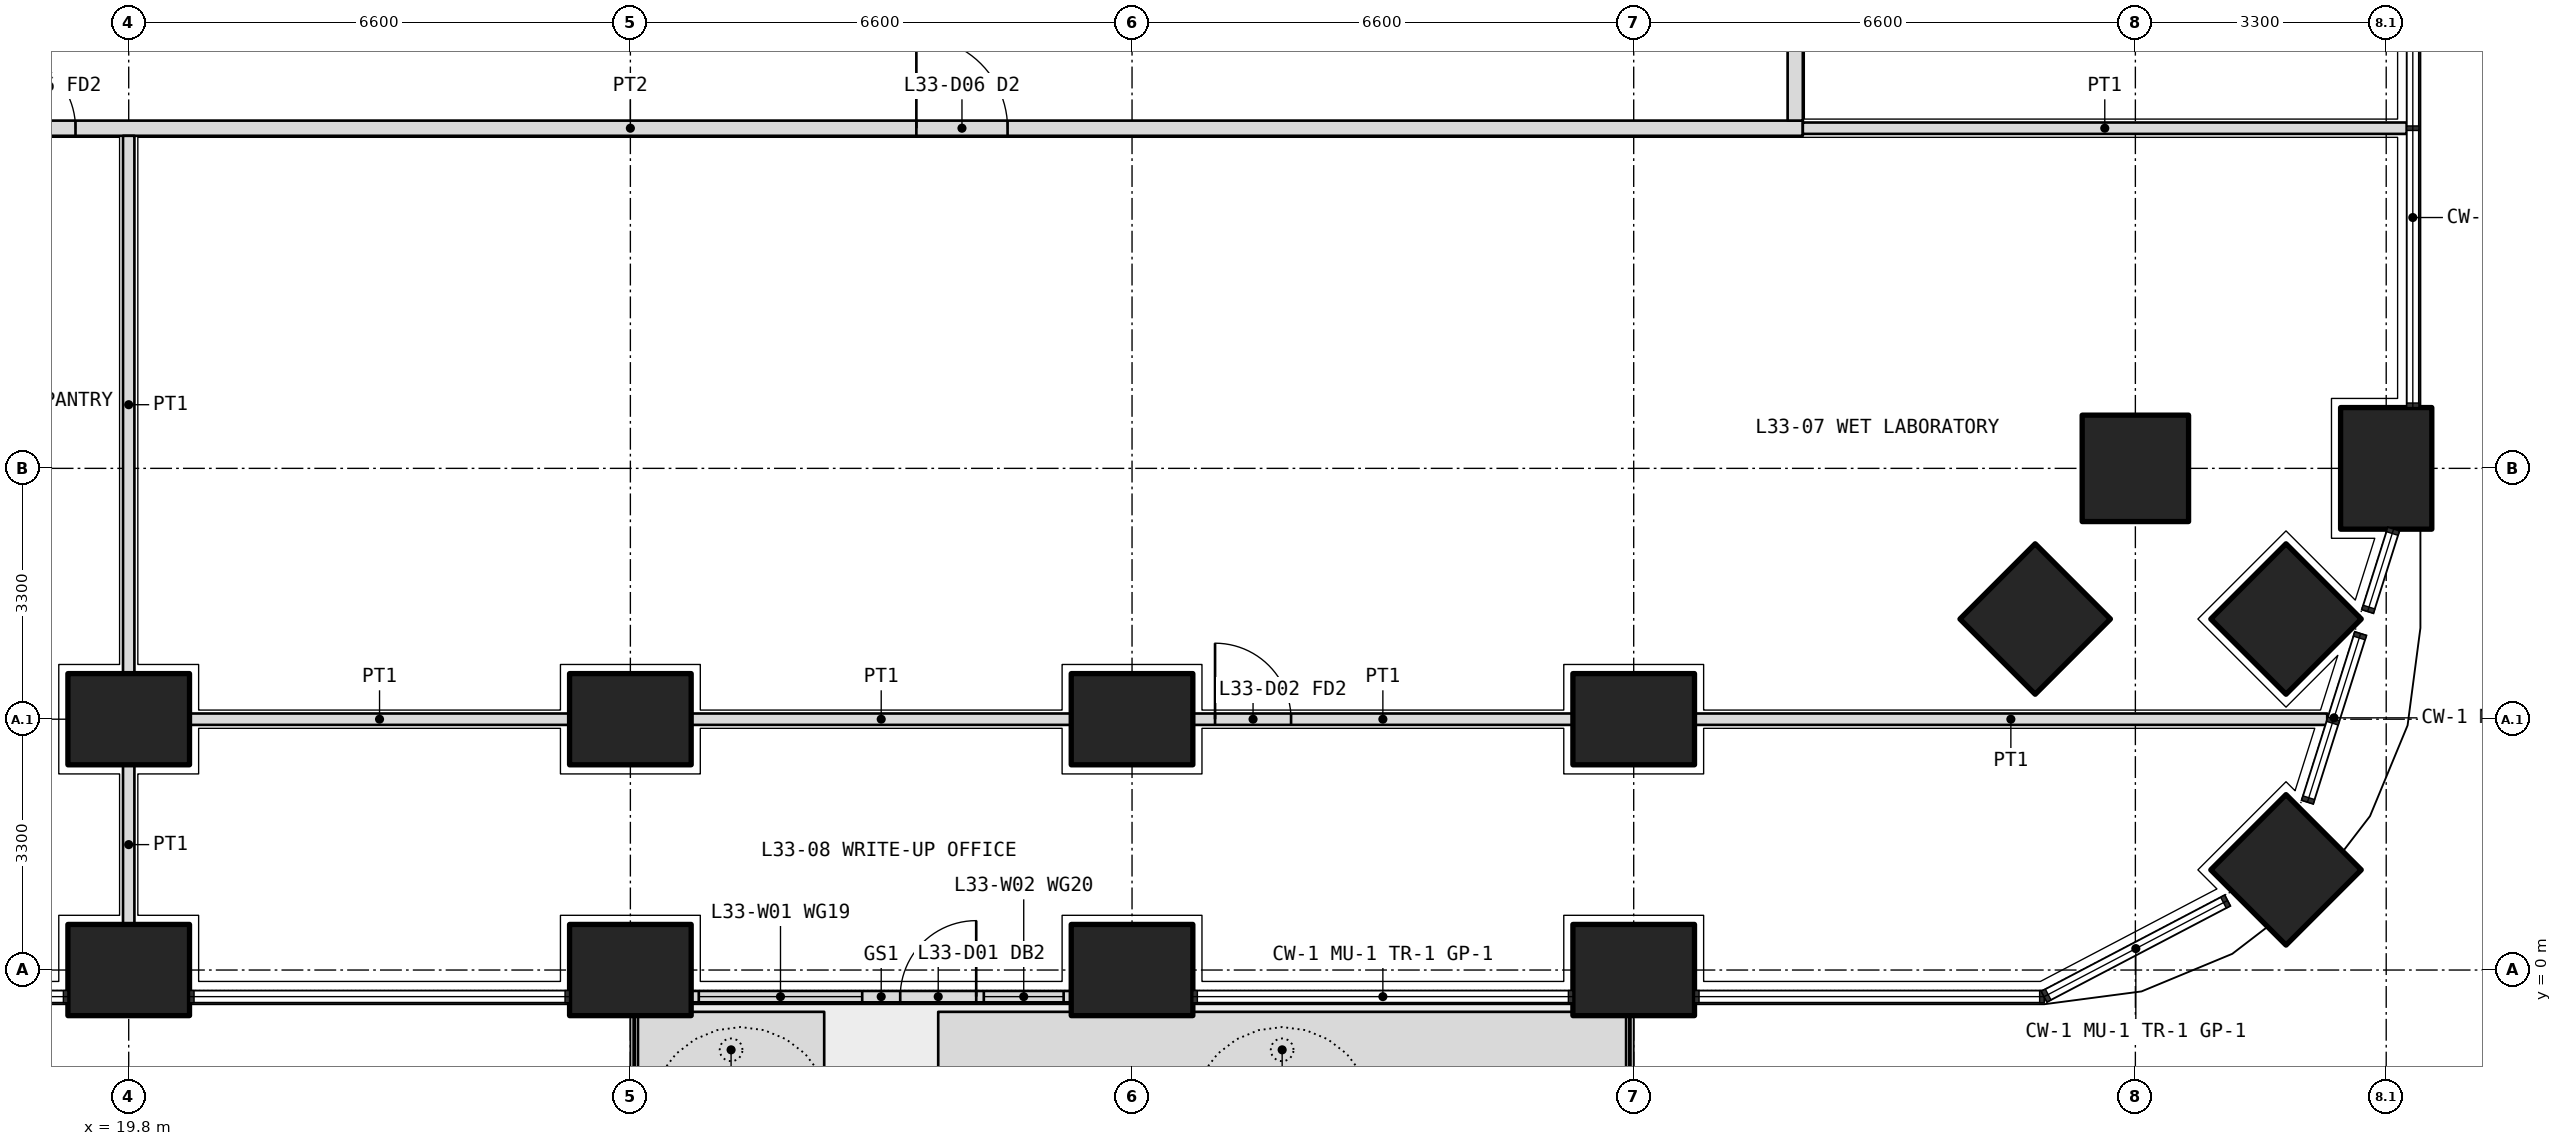
"""IFC4 building model, lengths in metres.
Left out: names, types, materials, properties, quantities, classifications, styles, units other than length and angle.
Written with IfcOpenShell. Run it as: python <this file> out.ifc"""

import sys

from ifc_helpers import new_model, si_unit, direction, frame, frame_2d, origin, origin_2d, place, context, subcontext, project, spatial, polyline, rectangle, outline, extrude, element, fill, save


model = new_model("IFC4")
c1 = context("Model", 3, precision=1e-05, world=origin(), true_north=direction((0.0, 1.0)))
c2 = subcontext(c1, "Body", "Model", "MODEL_VIEW")
j1 = project(units=[si_unit("LENGTHUNIT", "METRE"), si_unit("PLANEANGLEUNIT", "RADIAN")], contexts=[c1])
p1 = place(None, origin())
s1 = spatial("IfcSite", under=j1, at=p1, CompositionType="ELEMENT")
p2 = place(p1, origin())
s2 = spatial("IfcBuilding", under=s1, at=p2, CompositionType="ELEMENT")
p3 = place(p2, frame((0.0, 0.0, 145.2)))
s3 = spatial("IfcBuildingStorey", under=s2, at=p3, CompositionType="ELEMENT", Elevation=145.2)
p4 = place(p3, frame((48.182, 1.318, 0.0), z_axis=(0.0, 0.0, 1.0), x_axis=(0.707106781187, 0.707106781187, 0.0)))
e1 = element("IfcColumn", 1, at=p4, inside=s3, PredefinedType="COLUMN", context=c2, shape_type="SweptSolid", body=[
    extrude(rectangle(XDim=1.4, YDim=1.4, at=origin_2d()), origin(), (0.0, 0.0, 1.0), 4.2),
])
for number, where, z_axis, x_axis in (
    (2, (19.8, 0.0, 0.0), (0.0, 0.0, 1.0), (1.0, 0.0, 0.0)),
    (3, (26.4, 0.0, 0.0), (0.0, 0.0, 1.0), (1.0, 0.0, 0.0)),
    (4, (33.0, 0.0, 0.0), (0.0, 0.0, 1.0), (1.0, 0.0, 0.0)),
    (5, (39.6, 0.0, 0.0), (0.0, 0.0, 1.0), (1.0, 0.0, 0.0)),
    (6, (49.5, 6.6, 0.0), (0.0, 0.0, 1.0), (0.0, 1.0, 0.0)),
):
    element("IfcColumn", number, at=place(p3, frame(where, z_axis=z_axis, x_axis=x_axis)), inside=s3, PredefinedType="COLUMN", context=c2, shape_type="SweptSolid", body=[
        extrude(rectangle(XDim=1.6, YDim=1.2, at=origin_2d()), origin(), (0.0, 0.0, 1.0), 4.2),
    ])
for number, where, z_axis, x_axis in (
    (7, (46.2, 6.6, 0.0), (0.0, 0.0, 1.0), (1.0, 0.0, 0.0)),
    (8, (48.182, 4.618, 0.0), (0.0, 0.0, 1.0), (0.707, 0.707, 0.0)),
):
    element("IfcColumn", number, at=place(p3, frame(where, z_axis=z_axis, x_axis=x_axis)), inside=s3, PredefinedType="COLUMN", context=c2, shape_type="SweptSolid", body=[
        extrude(rectangle(XDim=1.4, YDim=1.4, at=origin_2d()), origin(), (0.0, 0.0, 1.0), 4.2),
    ])
for number, where, z_axis, x_axis in (
    (9, (19.8, 3.3, 0.0), (0.0, 0.0, 1.0), (1.0, 0.0, 0.0)),
    (10, (26.4, 3.3, 0.0), (0.0, 0.0, 1.0), (1.0, 0.0, 0.0)),
    (11, (33.0, 3.3, 0.0), (0.0, 0.0, 1.0), (1.0, 0.0, 0.0)),
    (12, (39.6, 3.3, 0.0), (0.0, 0.0, 1.0), (1.0, 0.0, 0.0)),
):
    element("IfcColumn", number, at=place(p3, frame(where, z_axis=z_axis, x_axis=x_axis)), inside=s3, PredefinedType="COLUMN", context=c2, shape_type="SweptSolid", body=[
        extrude(rectangle(XDim=1.6, YDim=1.2, at=origin_2d()), origin(), (0.0, 0.0, 1.0), 4.2),
    ])
p5 = place(p3, frame((44.882, 4.618, 0.0), z_axis=(0.0, 0.0, 1.0), x_axis=(0.707106781187, 0.707106781187, 0.0)))
e13 = element("IfcColumn", 13, at=p5, inside=s3, PredefinedType="COLUMN", context=c2, shape_type="SweptSolid", body=[
    extrude(rectangle(XDim=1.4, YDim=1.4, at=origin_2d()), origin(), (0.0, 0.0, 1.0), 4.2),
])
p6 = place(p3, origin())
e14 = element("IfcWall", 14, at=p6, inside=s3, PredefinedType="USERDEFINED", context=c2, shape_type="SweptSolid", body=[
    extrude(outline(polyline([(26.5, -1.55), (28.95, -1.55), (28.95, -0.55), (26.5, -0.55), (26.5, -1.55)]), holes=[polyline([(26.65, -1.4), (28.8, -1.4), (28.8, -0.7), (26.65, -0.7), (26.65, -1.4)])]), origin(), (0.0, 0.0, 1.0), 1.05),
])
p7 = place(p3, origin())
e15 = element("IfcWall", 15, at=p7, inside=s3, PredefinedType="USERDEFINED", context=c2, shape_type="SweptSolid", body=[
    extrude(outline(polyline([(30.45, -1.55), (39.5, -1.55), (39.5, -0.55), (30.45, -0.55), (30.45, -1.55)]), holes=[polyline([(30.6, -1.4), (39.35, -1.4), (39.35, -0.7), (30.6, -0.7), (30.6, -1.4)])]), origin(), (0.0, 0.0, 1.0), 1.05),
])
p8 = place(p3, frame((27.2, -0.35, 0.0), z_axis=(0.0, 0.0, 1.0), x_axis=(1.0, 0.0, 0.0)))
e16 = element("IfcWall", 16, at=p8, inside=s3, PredefinedType="SOLIDWALL", context=c2, shape_type="SweptSolid", body=[
    extrude(rectangle(XDim=5.0, YDim=0.15, at=frame_2d((2.5, 0.0))), origin(), (0.0, 0.0, 1.0), 2.05),
])
p9 = place(p8, frame((2.75, 0.0, 0.0)))
e17 = element("IfcOpeningElement", 17, at=p9, cuts=e16, PredefinedType="OPENING", context=c2, shape_type="SweptSolid", body=[
    extrude(rectangle(XDim=1.0, YDim=2.0, at=frame_2d((0.5, 1.0))), frame((0.0, 0.085, 0.0), z_axis=(0.0, -1.0, 0.0), x_axis=(1.0, 0.0, 0.0)), (0.0, 0.0, 1.0), 0.17),
])
p10 = place(p8, frame((0.1, 0.0, 0.1)))
e18 = element("IfcOpeningElement", 18, at=p10, cuts=e16, PredefinedType="OPENING", context=c2, shape_type="SweptSolid", body=[
    extrude(rectangle(XDim=2.15, YDim=1.65, at=frame_2d((1.075, 0.825))), frame((0.0, 0.085, 0.0), z_axis=(0.0, -1.0, 0.0), x_axis=(1.0, 0.0, 0.0)), (0.0, 0.0, 1.0), 0.17),
])
p11 = place(p8, frame((3.85, 0.0, 0.1)))
e19 = element("IfcOpeningElement", 19, at=p11, cuts=e16, PredefinedType="OPENING", context=c2, shape_type="SweptSolid", body=[
    extrude(rectangle(XDim=1.05, YDim=1.65, at=frame_2d((0.525, 0.825))), frame((0.0, 0.085, 0.0), z_axis=(0.0, -1.0, 0.0), x_axis=(1.0, 0.0, 0.0)), (0.0, 0.0, 1.0), 0.17),
])
p12 = place(p3, frame((10.975, 11.075, 0.0), z_axis=(0.0, 0.0, 1.0), x_axis=(1.0, 0.0, 0.0)))
e20 = element("IfcWall", 20, at=p12, inside=s3, PredefinedType="PARTITIONING", context=c2, shape_type="SweptSolid", body=[
    extrude(rectangle(XDim=30.85, YDim=0.2, at=frame_2d((15.425, 0.0))), origin(), (0.0, 0.0, 1.0), 2.55),
])
p13 = place(p12, frame((0.663, 0.0, 0.0)))
e21 = element("IfcOpeningElement", 21, at=p13, cuts=e20, PredefinedType="OPENING", context=c2, shape_type="SweptSolid", body=[
    extrude(rectangle(XDim=1.0, YDim=2.1, at=frame_2d((0.5, 1.05))), frame((0.0, 0.11, 0.0), z_axis=(0.0, -1.0, 0.0), x_axis=(1.0, 0.0, 0.0)), (0.0, 0.0, 1.0), 0.22),
])
p14 = place(p12, frame((3.825, 0.0, 0.0)))
e22 = element("IfcOpeningElement", 22, at=p14, cuts=e20, PredefinedType="OPENING", context=c2, shape_type="SweptSolid", body=[
    extrude(rectangle(XDim=1.0, YDim=2.1, at=frame_2d((0.5, 1.05))), frame((0.0, 0.11, 0.0), z_axis=(0.0, -1.0, 0.0), x_axis=(1.0, 0.0, 0.0)), (0.0, 0.0, 1.0), 0.22),
])
p15 = place(p12, frame((7.125, 0.0, 0.0)))
e23 = element("IfcOpeningElement", 23, at=p15, cuts=e20, PredefinedType="OPENING", context=c2, shape_type="SweptSolid", body=[
    extrude(rectangle(XDim=1.0, YDim=2.1, at=frame_2d((0.5, 1.05))), frame((0.0, 0.11, 0.0), z_axis=(0.0, -1.0, 0.0), x_axis=(1.0, 0.0, 0.0)), (0.0, 0.0, 1.0), 0.22),
])
p16 = place(p12, frame((19.188, 0.0, 0.0)))
e24 = element("IfcOpeningElement", 24, at=p16, cuts=e20, PredefinedType="OPENING", context=c2, shape_type="SweptSolid", body=[
    extrude(rectangle(XDim=1.2, YDim=2.1, at=frame_2d((0.6, 1.05))), frame((0.0, 0.11, 0.0), z_axis=(0.0, -1.0, 0.0), x_axis=(1.0, 0.0, 0.0)), (0.0, 0.0, 1.0), 0.22),
])
p17 = place(p3, frame((41.725, 11.175, 0.0), z_axis=(0.0, 0.0, 1.0), x_axis=(0.0, 1.0, 0.0)))
e25 = element("IfcWall", 25, at=p17, inside=s3, PredefinedType="PARTITIONING", context=c2, shape_type="SweptSolid", body=[
    extrude(rectangle(XDim=27.625, YDim=0.2, at=frame_2d((13.812, 0.0))), origin(), (0.0, 0.0, 1.0), 2.55),
])
p18 = place(p17, frame((3.762, 0.0, 0.0)))
e26 = element("IfcOpeningElement", 26, at=p18, cuts=e25, PredefinedType="OPENING", context=c2, shape_type="SweptSolid", body=[
    extrude(rectangle(XDim=1.0, YDim=2.1, at=frame_2d((0.5, 1.05))), frame((0.0, 0.11, 0.0), z_axis=(0.0, -1.0, 0.0), x_axis=(1.0, 0.0, 0.0)), (0.0, 0.0, 1.0), 0.22),
])
p19 = place(p17, frame((9.725, 0.0, 0.0)))
e27 = element("IfcOpeningElement", 27, at=p19, cuts=e25, PredefinedType="OPENING", context=c2, shape_type="SweptSolid", body=[
    extrude(rectangle(XDim=1.0, YDim=2.1, at=frame_2d((0.5, 1.05))), frame((0.0, 0.11, 0.0), z_axis=(0.0, -1.0, 0.0), x_axis=(1.0, 0.0, 0.0)), (0.0, 0.0, 1.0), 0.22),
])
p20 = place(p17, frame((13.075, 0.0, 0.0)))
e28 = element("IfcOpeningElement", 28, at=p20, cuts=e25, PredefinedType="OPENING", context=c2, shape_type="SweptSolid", body=[
    extrude(rectangle(XDim=0.9, YDim=2.1, at=frame_2d((0.45, 1.05))), frame((0.0, 0.11, 0.0), z_axis=(0.0, -1.0, 0.0), x_axis=(1.0, 0.0, 0.0)), (0.0, 0.0, 1.0), 0.22),
])
p21 = place(p17, frame((16.375, 0.0, 0.0)))
e29 = element("IfcOpeningElement", 29, at=p21, cuts=e25, PredefinedType="OPENING", context=c2, shape_type="SweptSolid", body=[
    extrude(rectangle(XDim=1.0, YDim=2.1, at=frame_2d((0.5, 1.05))), frame((0.0, 0.11, 0.0), z_axis=(0.0, -1.0, 0.0), x_axis=(1.0, 0.0, 0.0)), (0.0, 0.0, 1.0), 0.22),
])
p22 = place(p17, frame((19.675, 0.0, 0.0)))
e30 = element("IfcOpeningElement", 30, at=p22, cuts=e25, PredefinedType="OPENING", context=c2, shape_type="SweptSolid", body=[
    extrude(rectangle(XDim=1.0, YDim=2.1, at=frame_2d((0.5, 1.05))), frame((0.0, 0.11, 0.0), z_axis=(0.0, -1.0, 0.0), x_axis=(1.0, 0.0, 0.0)), (0.0, 0.0, 1.0), 0.22),
])
p23 = place(p17, frame((24.275, 0.0, 0.0)))
e31 = element("IfcOpeningElement", 31, at=p23, cuts=e25, PredefinedType="OPENING", context=c2, shape_type="SweptSolid", body=[
    extrude(rectangle(XDim=1.0, YDim=2.1, at=frame_2d((0.5, 1.05))), frame((0.0, 0.11, 0.0), z_axis=(0.0, -1.0, 0.0), x_axis=(1.0, 0.0, 0.0)), (0.0, 0.0, 1.0), 0.22),
])
p24 = place(p3, frame((49.77, 11.075, 0.0), z_axis=(0.0, 0.0, 1.0), x_axis=(-1.0, 0.0, 0.0)))
e32 = element("IfcWall", 32, at=p24, inside=s3, PredefinedType="PARTITIONING", context=c2, shape_type="SweptSolid", body=[
    extrude(rectangle(XDim=7.945, YDim=0.15, at=frame_2d((3.973, 0.0))), origin(), (0.0, 0.0, 1.0), 3.85),
])
for number, where, z_axis, x_axis in (
    (33, (20.6, 3.3, 0.0), (0.0, 0.0, 1.0), (1.0, 0.0, 0.0)),
    (34, (27.2, 3.3, 0.0), (0.0, 0.0, 1.0), (1.0, 0.0, 0.0)),
):
    element("IfcWall", number, at=place(p3, frame(where, z_axis=z_axis, x_axis=x_axis)), inside=s3, PredefinedType="PARTITIONING", context=c2, shape_type="SweptSolid", body=[
        extrude(rectangle(XDim=5.0, YDim=0.15, at=frame_2d((2.5, 0.0))), origin(), (0.0, 0.0, 1.0), 2.55),
    ])
p25 = place(p3, frame((33.8, 3.3, 0.0), z_axis=(0.0, 0.0, 1.0), x_axis=(1.0, 0.0, 0.0)))
e35 = element("IfcWall", 35, at=p25, inside=s3, PredefinedType="PARTITIONING", context=c2, shape_type="SweptSolid", body=[
    extrude(rectangle(XDim=5.0, YDim=0.15, at=frame_2d((2.5, 0.0))), origin(), (0.0, 0.0, 1.0), 2.55),
])
p26 = place(p25, frame((0.292, 0.0, 0.0)))
e36 = element("IfcOpeningElement", 36, at=p26, cuts=e35, PredefinedType="OPENING", context=c2, shape_type="SweptSolid", body=[
    extrude(rectangle(XDim=1.0, YDim=2.1, at=frame_2d((0.5, 1.05))), frame((0.0, 0.085, 0.0), z_axis=(0.0, -1.0, 0.0), x_axis=(1.0, 0.0, 0.0)), (0.0, 0.0, 1.0), 0.17),
])
p27 = place(p3, frame((40.4, 3.3, 0.0), z_axis=(0.0, 0.0, 1.0), x_axis=(1.0, 0.0, 0.0)))
e37 = element("IfcWall", 37, at=p27, inside=s3, PredefinedType="PARTITIONING", context=c2, shape_type="SweptSolid", body=[
    extrude(rectangle(XDim=8.324, YDim=0.15, at=frame_2d((4.162, 0.0))), origin(), (0.0, 0.0, 1.0), 3.85),
])
p28 = place(p3, frame((19.8, 0.6, 0.0), z_axis=(0.0, 0.0, 1.0), x_axis=(0.0, 1.0, 0.0)))
e38 = element("IfcWall", 38, at=p28, inside=s3, PredefinedType="PARTITIONING", context=c2, shape_type="SweptSolid", body=[
    extrude(rectangle(XDim=2.1, YDim=0.15, at=frame_2d((1.05, 0.0))), origin(), (0.0, 0.0, 1.0), 2.55),
])
p29 = place(p3, frame((19.8, 3.9, 0.0), z_axis=(0.0, 0.0, 1.0), x_axis=(0.0, 1.0, 0.0)))
e39 = element("IfcWall", 39, at=p29, inside=s3, PredefinedType="PARTITIONING", context=c2, shape_type="SweptSolid", body=[
    extrude(rectangle(XDim=7.075, YDim=0.15, at=frame_2d((3.538, 0.0))), origin(), (0.0, 0.0, 1.0), 2.55),
])
p30 = place(p9, origin())
e40 = element("IfcDoor", 40, at=p30, inside=s3, OperationType="SINGLE_SWING_RIGHT", PredefinedType="DOOR", context=c2, shape_type="SweptSolid", body=[
    extrude(rectangle(XDim=1.0, YDim=2.0, at=frame_2d((0.5, 1.0))), frame((0.0, 0.025, 0.0), z_axis=(0.0, -1.0, 0.0), x_axis=(1.0, 0.0, 0.0)), (0.0, 0.0, 1.0), 0.05),
])
fill(e17, e40)
p31 = place(p10, origin())
e41 = element("IfcWindow", 41, at=p31, inside=s3, PartitioningType="SINGLE_PANEL", PredefinedType="WINDOW", context=c2, shape_type="SweptSolid", body=[
    extrude(rectangle(XDim=2.15, YDim=1.65, at=frame_2d((1.075, 0.825))), frame((0.0, 0.03, 0.0), z_axis=(0.0, -1.0, 0.0), x_axis=(1.0, 0.0, 0.0)), (0.0, 0.0, 1.0), 0.06),
])
fill(e18, e41)
p32 = place(p11, origin())
e42 = element("IfcWindow", 42, at=p32, inside=s3, PartitioningType="SINGLE_PANEL", PredefinedType="WINDOW", context=c2, shape_type="SweptSolid", body=[
    extrude(rectangle(XDim=1.05, YDim=1.65, at=frame_2d((0.525, 0.825))), frame((0.0, 0.03, 0.0), z_axis=(0.0, -1.0, 0.0), x_axis=(1.0, 0.0, 0.0)), (0.0, 0.0, 1.0), 0.06),
])
fill(e19, e42)
p33 = place(p15, origin())
e43 = element("IfcDoor", 43, at=p33, inside=s3, OperationType="SINGLE_SWING_LEFT", PredefinedType="DOOR", context=c2, shape_type="SweptSolid", body=[
    extrude(rectangle(XDim=1.0, YDim=2.1, at=frame_2d((0.5, 1.05))), frame((0.0, 0.025, 0.0), z_axis=(0.0, -1.0, 0.0), x_axis=(1.0, 0.0, 0.0)), (0.0, 0.0, 1.0), 0.05),
])
fill(e23, e43)
p34 = place(p16, origin())
e44 = element("IfcDoor", 44, at=p34, inside=s3, OperationType="DOUBLE_DOOR_SINGLE_SWING", PredefinedType="DOOR", context=c2, shape_type="SweptSolid", body=[
    extrude(rectangle(XDim=1.2, YDim=2.1, at=frame_2d((0.6, 1.05))), frame((0.0, 0.025, 0.0), z_axis=(0.0, -1.0, 0.0), x_axis=(1.0, 0.0, 0.0)), (0.0, 0.0, 1.0), 0.05),
])
fill(e24, e44)
p35 = place(p26, origin())
e45 = element("IfcDoor", 45, at=p35, inside=s3, OperationType="SINGLE_SWING_LEFT", PredefinedType="DOOR", context=c2, shape_type="SweptSolid", body=[
    extrude(rectangle(XDim=1.0, YDim=2.1, at=frame_2d((0.5, 1.05))), frame((0.0, 0.025, 0.0), z_axis=(0.0, -1.0, 0.0), x_axis=(1.0, 0.0, 0.0)), (0.0, 0.0, 1.0), 0.05),
])
fill(e36, e45)
save(model, sys.argv[1])
